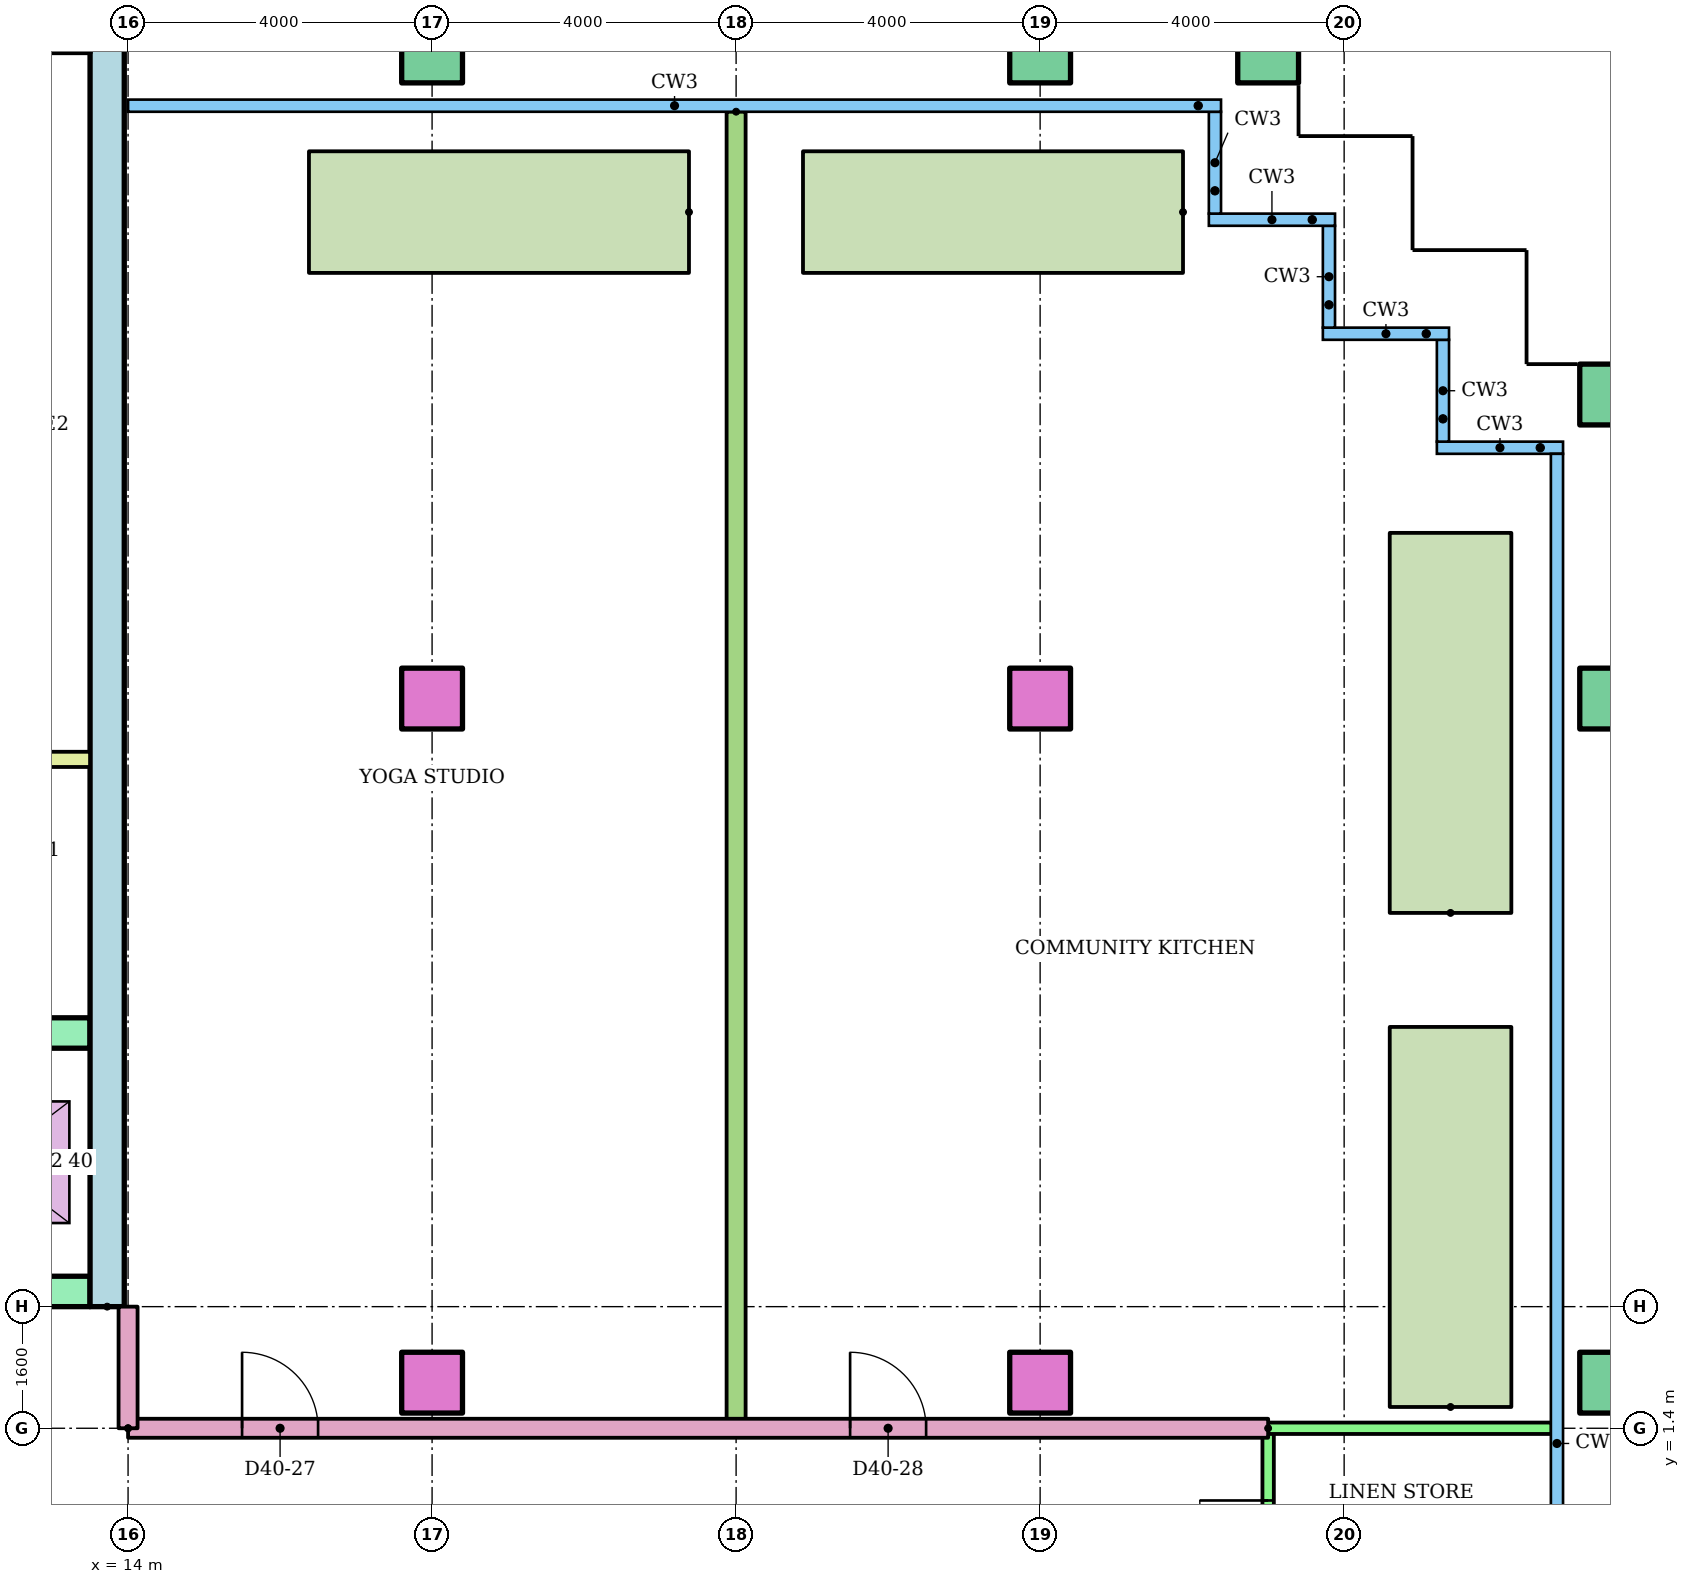
"""IFC4 building model, lengths in metres.
Left out: names, types, materials, properties, quantities, classifications, styles, units other than length and angle.
Written with IfcOpenShell. Run it as: python <this file> out.ifc"""

import sys

from ifc_helpers import new_model, si_unit, direction, frame, frame_2d, origin, origin_2d, place, context, subcontext, project, spatial, rectangle, hollow_rectangle, extrude, element, fill, save


model = new_model("IFC4")
c1 = context("Model", 3, precision=1e-05, world=origin(), true_north=direction((0.0, 1.0)))
c2 = subcontext(c1, "Body", "Model", "MODEL_VIEW")
j1 = project(units=[si_unit("LENGTHUNIT", "METRE"), si_unit("PLANEANGLEUNIT", "RADIAN")], contexts=[c1])
p1 = place(None, origin())
s1 = spatial("IfcSite", under=j1, at=p1, CompositionType="ELEMENT")
p2 = place(p1, origin())
s2 = spatial("IfcBuilding", under=s1, at=p2, CompositionType="ELEMENT")
p3 = place(p2, frame((0.0, 0.0, 151.8)))
s3 = spatial("IfcBuildingStorey", under=s2, at=p3, CompositionType="ELEMENT", Elevation=151.8)
for number, where in (
    (1, (18.0, 2.0, 0.0)),
    (2, (26.0, 2.0, 0.0)),
):
    element("IfcColumn", number, at=place(p3, frame(where)), inside=s3, PredefinedType="COLUMN", context=c2, shape_type="SweptSolid", body=[
        extrude(rectangle(XDim=0.8, YDim=0.8, at=origin_2d()), origin(), (0.0, 0.0, 1.0), 9.6),
    ])
p4 = place(p3, frame((33.5, 2.0, 0.0)))
e3 = element("IfcColumn", 3, at=p4, inside=s3, PredefinedType="COLUMN", context=c2, shape_type="SweptSolid", body=[
    extrude(hollow_rectangle(XDim=0.8, YDim=0.8, WallThickness=0.04, at=origin_2d()), origin(), (0.0, 0.0, 1.0), 8.8),
])
for number, where in (
    (4, (18.0, 11.0, 0.0)),
    (5, (26.0, 11.0, 0.0)),
):
    element("IfcColumn", number, at=place(p3, frame(where)), inside=s3, PredefinedType="COLUMN", context=c2, shape_type="SweptSolid", body=[
        extrude(rectangle(XDim=0.8, YDim=0.8, at=origin_2d()), origin(), (0.0, 0.0, 1.0), 9.6),
    ])
for number, where in (
    (6, (33.5, 11.0, 0.0)),
    (7, (33.5, 15.0, 0.0)),
):
    element("IfcColumn", number, at=place(p3, frame(where)), inside=s3, PredefinedType="COLUMN", context=c2, shape_type="SweptSolid", body=[
        extrude(hollow_rectangle(XDim=0.8, YDim=0.8, WallThickness=0.04, at=origin_2d()), origin(), (0.0, 0.0, 1.0), 8.8),
    ])
for number, where in (
    (8, (18.0, 19.5, 0.0)),
    (9, (26.0, 19.5, 0.0)),
):
    element("IfcColumn", number, at=place(p3, frame(where)), inside=s3, PredefinedType="COLUMN", context=c2, shape_type="SweptSolid", body=[
        extrude(hollow_rectangle(XDim=0.8, YDim=0.8, WallThickness=0.04, at=origin_2d()), origin(), (0.0, 0.0, 1.0), 9.6),
    ])
p5 = place(p3, frame((29.0, 19.5, 0.0)))
e10 = element("IfcColumn", 10, at=p5, inside=s3, PredefinedType="COLUMN", context=c2, shape_type="SweptSolid", body=[
    extrude(hollow_rectangle(XDim=0.8, YDim=0.8, WallThickness=0.04, at=origin_2d()), origin(), (0.0, 0.0, 1.0), 8.8),
])
for number, where, z_axis, x_axis in (
    (11, (27.88, 17.4, 0.0), (0.0, 0.0, 1.0), (-1.0, 0.0, 0.0)),
    (12, (21.38, 17.4, 0.0), (0.0, 0.0, 1.0), (-1.0, 0.0, 0.0)),
    (13, (31.4, 1.68, 0.0), (0.0, 0.0, 1.0), (0.0, 1.0, 0.0)),
    (14, (31.4, 8.18, 0.0), (0.0, 0.0, 1.0), (0.0, 1.0, 0.0)),
):
    element("IfcWall", number, at=place(p3, frame(where, z_axis=z_axis, x_axis=x_axis)), inside=s3, PredefinedType="STANDARD", context=c2, shape_type="SweptSolid", body=[
        extrude(rectangle(XDim=5.0, YDim=1.6, at=frame_2d((2.5, 0.0))), origin(), (0.0, 0.0, 1.0), 0.8),
    ])
p6 = place(p3, frame((13.725, 3.0, 0.0), z_axis=(0.0, 0.0, 1.0), x_axis=(0.0, 1.0, 0.0)))
e15 = element("IfcWall", 15, at=p6, inside=s3, PredefinedType="SHEAR", context=c2, shape_type="SweptSolid", body=[
    extrude(rectangle(XDim=17.0, YDim=0.45, at=frame_2d((8.5, 0.0))), origin(), (0.0, 0.0, 1.0), 8.8),
])
p7 = place(p3, frame((-13.5, 3.2, 0.0)))
e16 = element("IfcWall", 16, at=p7, inside=s3, PredefinedType="SHEAR", context=c2, shape_type="SweptSolid", body=[
    extrude(rectangle(XDim=27.0, YDim=0.4, at=frame_2d((13.5, 0.0))), origin(), (0.0, 0.0, 1.0), 8.8),
])
p8 = place(p7, frame((0.772, 0.0, 0.0)))
e17 = element("IfcOpeningElement", 17, at=p8, cuts=e16, PredefinedType="OPENING", context=c2, shape_type="SweptSolid", body=[
    extrude(rectangle(XDim=1.1, YDim=2.1, at=frame_2d((0.55, 1.05))), frame((0.0, 0.21, 0.0), z_axis=(0.0, -1.0, 0.0), x_axis=(1.0, 0.0, 0.0)), (0.0, 0.0, 1.0), 0.42),
])
p9 = place(p7, frame((3.817, 0.0, 0.0)))
e18 = element("IfcOpeningElement", 18, at=p9, cuts=e16, PredefinedType="OPENING", context=c2, shape_type="SweptSolid", body=[
    extrude(rectangle(XDim=1.1, YDim=2.1, at=frame_2d((0.55, 1.05))), frame((0.0, 0.21, 0.0), z_axis=(0.0, -1.0, 0.0), x_axis=(1.0, 0.0, 0.0)), (0.0, 0.0, 1.0), 0.42),
])
p10 = place(p7, frame((6.861, 0.0, 0.0)))
e19 = element("IfcOpeningElement", 19, at=p10, cuts=e16, PredefinedType="OPENING", context=c2, shape_type="SweptSolid", body=[
    extrude(rectangle(XDim=1.1, YDim=2.1, at=frame_2d((0.55, 1.05))), frame((0.0, 0.21, 0.0), z_axis=(0.0, -1.0, 0.0), x_axis=(1.0, 0.0, 0.0)), (0.0, 0.0, 1.0), 0.42),
])
p11 = place(p7, frame((9.906, 0.0, 0.0)))
e20 = element("IfcOpeningElement", 20, at=p11, cuts=e16, PredefinedType="OPENING", context=c2, shape_type="SweptSolid", body=[
    extrude(rectangle(XDim=1.1, YDim=2.1, at=frame_2d((0.55, 1.05))), frame((0.0, 0.21, 0.0), z_axis=(0.0, -1.0, 0.0), x_axis=(1.0, 0.0, 0.0)), (0.0, 0.0, 1.0), 0.42),
])
p12 = place(p7, frame((15.994, 0.0, 0.0)))
e21 = element("IfcOpeningElement", 21, at=p12, cuts=e16, PredefinedType="OPENING", context=c2, shape_type="SweptSolid", body=[
    extrude(rectangle(XDim=1.1, YDim=2.1, at=frame_2d((0.55, 1.05))), frame((0.0, 0.21, 0.0), z_axis=(0.0, -1.0, 0.0), x_axis=(1.0, 0.0, 0.0)), (0.0, 0.0, 1.0), 0.42),
])
p13 = place(p7, frame((19.039, 0.0, 0.0)))
e22 = element("IfcOpeningElement", 22, at=p13, cuts=e16, PredefinedType="OPENING", context=c2, shape_type="SweptSolid", body=[
    extrude(rectangle(XDim=1.1, YDim=2.1, at=frame_2d((0.55, 1.05))), frame((0.0, 0.21, 0.0), z_axis=(0.0, -1.0, 0.0), x_axis=(1.0, 0.0, 0.0)), (0.0, 0.0, 1.0), 0.42),
])
p14 = place(p7, frame((22.083, 0.0, 0.0)))
e23 = element("IfcOpeningElement", 23, at=p14, cuts=e16, PredefinedType="OPENING", context=c2, shape_type="SweptSolid", body=[
    extrude(rectangle(XDim=1.1, YDim=2.1, at=frame_2d((0.55, 1.05))), frame((0.0, 0.21, 0.0), z_axis=(0.0, -1.0, 0.0), x_axis=(1.0, 0.0, 0.0)), (0.0, 0.0, 1.0), 0.42),
])
p15 = place(p7, frame((25.128, 0.0, 0.0)))
e24 = element("IfcOpeningElement", 24, at=p15, cuts=e16, PredefinedType="OPENING", context=c2, shape_type="SweptSolid", body=[
    extrude(rectangle(XDim=1.1, YDim=2.1, at=frame_2d((0.55, 1.05))), frame((0.0, 0.21, 0.0), z_axis=(0.0, -1.0, 0.0), x_axis=(1.0, 0.0, 0.0)), (0.0, 0.0, 1.0), 0.42),
])
p16 = place(p7, frame((12.6, 0.0, 0.0)))
e25 = element("IfcOpeningElement", 25, at=p16, cuts=e16, PredefinedType="OPENING", context=c2, shape_type="SweptSolid", body=[
    extrude(rectangle(XDim=1.8, YDim=2.1, at=frame_2d((0.9, 1.05))), frame((0.0, 0.21, 0.0), z_axis=(0.0, -1.0, 0.0), x_axis=(1.0, 0.0, 0.0)), (0.0, 0.0, 1.0), 0.42),
])
p17 = place(p3, frame((1.522, 6.6, 0.0)))
e26 = element("IfcWall", 26, at=p17, inside=s3, PredefinedType="SHEAR", context=c2, shape_type="SweptSolid", body=[
    extrude(rectangle(XDim=11.978, YDim=0.4, at=frame_2d((5.989, 0.0))), origin(), (0.0, 0.0, 1.0), 8.8),
])
p18 = place(p3, frame((9.6, 10.2, 0.0)))
e27 = element("IfcWall", 27, at=p18, inside=s3, PredefinedType="PARTITIONING", context=c2, shape_type="SweptSolid", body=[
    extrude(rectangle(XDim=3.9, YDim=0.2, at=frame_2d((1.95, 0.0))), origin(), (0.0, 0.0, 1.0), 8.8),
])
p19 = place(p3, frame((29.0, -1.4, 0.0), z_axis=(0.0, 0.0, 1.0), x_axis=(0.0, 1.0, 0.0)))
e28 = element("IfcWall", 28, at=p19, inside=s3, PredefinedType="PARTITIONING", context=c2, shape_type="SweptSolid", body=[
    extrude(rectangle(XDim=2.8, YDim=0.15, at=frame_2d((1.4, 0.0))), origin(), (0.0, 0.0, 1.0), 8.8),
])
p20 = place(p19, frame((0.95, 0.0, 0.0)))
e29 = element("IfcOpeningElement", 29, at=p20, cuts=e28, PredefinedType="OPENING", context=c2, shape_type="SweptSolid", body=[
    extrude(rectangle(XDim=0.9, YDim=2.1, at=frame_2d((0.45, 1.05))), frame((0.0, 0.085, 0.0), z_axis=(0.0, -1.0, 0.0), x_axis=(1.0, 0.0, 0.0)), (0.0, 0.0, 1.0), 0.17),
])
p21 = place(p3, frame((14.0, 1.4, 0.0)))
e30 = element("IfcWall", 30, at=p21, inside=s3, PredefinedType="PARTITIONING", context=c2, shape_type="SweptSolid", body=[
    extrude(rectangle(XDim=15.0, YDim=0.25, at=frame_2d((7.5, 0.0))), origin(), (0.0, 0.0, 1.0), 8.8),
])
p22 = place(p21, frame((1.5, 0.0, 0.0)))
e31 = element("IfcOpeningElement", 31, at=p22, cuts=e30, PredefinedType="OPENING", context=c2, shape_type="SweptSolid", body=[
    extrude(rectangle(XDim=1.0, YDim=2.1, at=frame_2d((0.5, 1.05))), frame((0.0, 0.135, 0.0), z_axis=(0.0, -1.0, 0.0), x_axis=(1.0, 0.0, 0.0)), (0.0, 0.0, 1.0), 0.27),
])
p23 = place(p21, frame((9.5, 0.0, 0.0)))
e32 = element("IfcOpeningElement", 32, at=p23, cuts=e30, PredefinedType="OPENING", context=c2, shape_type="SweptSolid", body=[
    extrude(rectangle(XDim=1.0, YDim=2.1, at=frame_2d((0.5, 1.05))), frame((0.0, 0.135, 0.0), z_axis=(0.0, -1.0, 0.0), x_axis=(1.0, 0.0, 0.0)), (0.0, 0.0, 1.0), 0.27),
])
p24 = place(p3, frame((29.0, 1.4, 0.0)))
e33 = element("IfcWall", 33, at=p24, inside=s3, PredefinedType="PARTITIONING", context=c2, shape_type="SweptSolid", body=[
    extrude(rectangle(XDim=3.73, YDim=0.15, at=frame_2d((1.865, 0.0))), origin(), (0.0, 0.0, 1.0), 8.8),
])
p25 = place(p3, frame((22.0, 18.721, 0.0), z_axis=(0.0, 0.0, 1.0), x_axis=(0.0, -1.0, 0.0)))
e34 = element("IfcWall", 34, at=p25, inside=s3, PredefinedType="PARTITIONING", context=c2, shape_type="SweptSolid", body=[
    extrude(rectangle(XDim=17.321, YDim=0.25, at=frame_2d((8.661, 0.0))), origin(), (0.0, 0.0, 1.0), 8.8),
])
p26 = place(p3, frame((14.0, 1.4, 0.0), z_axis=(0.0, 0.0, 1.0), x_axis=(0.0, 1.0, 0.0)))
e35 = element("IfcWall", 35, at=p26, inside=s3, PredefinedType="PARTITIONING", context=c2, shape_type="SweptSolid", body=[
    extrude(rectangle(XDim=1.6, YDim=0.25, at=frame_2d((0.8, 0.0))), origin(), (0.0, 0.0, 1.0), 8.8),
])
p27 = place(p20, origin())
e36 = element("IfcDoor", 36, at=p27, inside=s3, OperationType="SINGLE_SWING_RIGHT", PredefinedType="DOOR", context=c2, shape_type="SweptSolid", body=[
    extrude(rectangle(XDim=0.9, YDim=2.1, at=frame_2d((0.45, 1.05))), frame((0.0, 0.025, 0.0), z_axis=(0.0, -1.0, 0.0), x_axis=(1.0, 0.0, 0.0)), (0.0, 0.0, 1.0), 0.05),
])
fill(e29, e36)
p28 = place(p22, origin())
e37 = element("IfcDoor", 37, at=p28, inside=s3, OperationType="SINGLE_SWING_LEFT", PredefinedType="DOOR", context=c2, shape_type="SweptSolid", body=[
    extrude(rectangle(XDim=1.0, YDim=2.1, at=frame_2d((0.5, 1.05))), frame((0.0, 0.025, 0.0), z_axis=(0.0, -1.0, 0.0), x_axis=(1.0, 0.0, 0.0)), (0.0, 0.0, 1.0), 0.05),
])
fill(e31, e37)
p29 = place(p23, origin())
e38 = element("IfcDoor", 38, at=p29, inside=s3, OperationType="SINGLE_SWING_LEFT", PredefinedType="DOOR", context=c2, shape_type="SweptSolid", body=[
    extrude(rectangle(XDim=1.0, YDim=2.1, at=frame_2d((0.5, 1.05))), frame((0.0, 0.025, 0.0), z_axis=(0.0, -1.0, 0.0), x_axis=(1.0, 0.0, 0.0)), (0.0, 0.0, 1.0), 0.05),
])
fill(e32, e38)
save(model, sys.argv[1])
